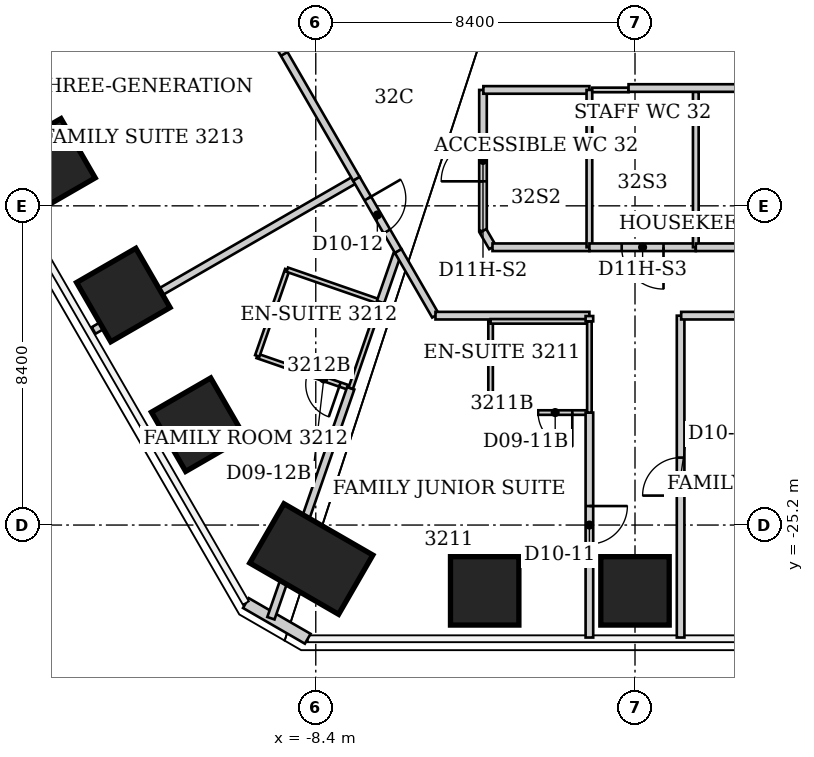
"""IFC4 building model, lengths in metres.
Left out: names, types, materials, properties, quantities, classifications, styles, units other than length and angle.
Written with IfcOpenShell. Run it as: python <this file> out.ifc"""

import sys

from ifc_helpers import new_model, si_unit, direction, frame, frame_2d, origin, origin_2d, place, context, subcontext, project, spatial, rectangle, extrude, element, fill, save


model = new_model("IFC4")
c1 = context("Model", 3, precision=1e-05, world=origin(), true_north=direction((0.0, 1.0)))
c2 = subcontext(c1, "Body", "Model", "MODEL_VIEW")
j1 = project(units=[si_unit("LENGTHUNIT", "METRE"), si_unit("PLANEANGLEUNIT", "RADIAN")], contexts=[c1])
p1 = place(None, origin())
s1 = spatial("IfcSite", under=j1, at=p1, CompositionType="ELEMENT")
p2 = place(p1, origin())
s2 = spatial("IfcBuilding", under=s1, at=p2, CompositionType="ELEMENT")
p3 = place(p2, frame((0.0, 0.0, 131.0)))
s3 = spatial("IfcBuildingStorey", under=s2, at=p3, CompositionType="ELEMENT", Elevation=131.0)
for number, where, z_axis, x_axis in (
    (1, (0.0, -26.932, 0.0), (0.0, 0.0, 1.0), (0.0, -1.0, 0.0)),
    (2, (-3.955, -26.932, 0.0), (0.0, 0.0, 1.0), (0.0, -1.0, 0.0)),
):
    element("IfcColumn", number, at=place(p3, frame(where, z_axis=z_axis, x_axis=x_axis)), inside=s3, PredefinedType="COLUMN", context=c2, shape_type="SweptSolid", body=[
        extrude(rectangle(XDim=1.8, YDim=1.8, at=origin_2d()), origin(), (0.0, 0.0, 1.0), 3.8),
    ])
p4 = place(p3, frame((-8.518, -26.094, 0.0), z_axis=(0.0, 0.0, 1.0), x_axis=(-0.5, -0.866025403784, 0.0)))
e3 = element("IfcColumn", 3, at=p4, inside=s3, PredefinedType="COLUMN", context=c2, shape_type="SweptSolid", body=[
    extrude(rectangle(XDim=1.8, YDim=2.7, at=origin_2d()), origin(), (0.0, 0.0, 1.0), 3.8),
])
for number, where, z_axis, x_axis in (
    (4, (-11.494, -22.559, 0.0), (0.0, 0.0, 1.0), (-0.866, -0.5, 0.0)),
    (5, (-13.464, -19.147, 0.0), (0.0, 0.0, 1.0), (-0.866, -0.5, 0.0)),
    (6, (-15.434, -15.735, 0.0), (0.0, 0.0, 1.0), (-0.866, -0.5, 0.0)),
):
    element("IfcColumn", number, at=place(p3, frame(where, z_axis=z_axis, x_axis=x_axis)), inside=s3, PredefinedType="COLUMN", context=c2, shape_type="SweptSolid", body=[
        extrude(rectangle(XDim=1.8, YDim=1.8, at=origin_2d()), origin(), (0.0, 0.0, 1.0), 3.8),
    ])
p5 = place(p3, frame((-8.611, -28.192, 0.0), z_axis=(0.0, 0.0, 1.0), x_axis=(-0.866045024864, 0.499966013754, 0.0)))
e7 = element("IfcWall", 7, at=p5, inside=s3, PredefinedType="SOLIDWALL", context=c2, shape_type="SweptSolid", body=[
    extrude(rectangle(XDim=1.88, YDim=0.3, at=frame_2d((0.94, 0.0))), origin(), (0.0, 0.0, 1.0), 3.64),
])
p6 = place(p3, frame((-14.246, -20.08, 0.0), z_axis=(0.0, 0.0, 1.0), x_axis=(0.866178955952, 0.49973394548, 0.0)))
e8 = element("IfcWall", 8, at=p6, inside=s3, PredefinedType="PARTITIONING", context=c2, shape_type="SweptSolid", body=[
    extrude(rectangle(XDim=7.969, YDim=0.2, at=frame_2d((3.985, 0.0))), origin(), (0.0, 0.0, 1.0), 3.64),
])
p7 = place(p3, frame((-11.63, -8.65, 0.0), z_axis=(0.0, 0.0, 1.0), x_axis=(0.500367528775, -0.865813106939, 0.0)))
e9 = element("IfcWall", 9, at=p7, inside=s3, PredefinedType="PARTITIONING", context=c2, shape_type="SweptSolid", body=[
    extrude(rectangle(XDim=8.593, YDim=0.2, at=frame_2d((4.297, 0.0))), origin(), (0.0, 0.0, 1.0), 3.64),
])
p8 = place(p7, frame((3.797, 0.0, 0.0)))
e10 = element("IfcOpeningElement", 10, at=p8, cuts=e9, PredefinedType="OPENING", context=c2, shape_type="SweptSolid", body=[
    extrude(rectangle(XDim=1.0, YDim=2.13, at=frame_2d((0.5, 1.065))), frame((0.0, 0.1, 0.0), z_axis=(0.0, -1.0, 0.0), x_axis=(1.0, 0.0, 0.0)), (0.0, 0.0, 1.0), 0.2),
])
p9 = place(p3, frame((-9.94, -20.75, 0.0), z_axis=(0.0, 0.0, 1.0), x_axis=(0.94515546045, -0.326620813149, 0.0)))
e11 = element("IfcWall", 11, at=p9, inside=s3, PredefinedType="PARTITIONING", context=c2, shape_type="SweptSolid", body=[
    extrude(rectangle(XDim=2.603, YDim=0.12, at=frame_2d((1.301, 0.0))), origin(), (0.0, 0.0, 1.0), 3.64),
])
p10 = place(p9, frame((1.403, 0.0, 0.0)))
e12 = element("IfcOpeningElement", 12, at=p10, cuts=e11, PredefinedType="OPENING", context=c2, shape_type="SweptSolid", body=[
    extrude(rectangle(XDim=0.9, YDim=2.03, at=frame_2d((0.45, 1.015))), frame((0.0, 0.06, 0.0), z_axis=(0.0, -1.0, 0.0), x_axis=(1.0, 0.0, 0.0)), (0.0, 0.0, 1.0), 0.12),
])
p11 = place(p3, frame((-9.58, -27.652, 0.0), z_axis=(0.0, 0.0, 1.0), x_axis=(0.327855318627, 0.944727944991, 0.0)))
e13 = element("IfcWall", 13, at=p11, inside=s3, PredefinedType="PARTITIONING", context=c2, shape_type="SweptSolid", body=[
    extrude(rectangle(XDim=6.406, YDim=0.2, at=frame_2d((3.203, 0.0))), origin(), (0.0, 0.0, 1.0), 3.64),
])
p12 = place(p3, frame((-9.15, -18.48, 0.0), z_axis=(0.0, 0.0, 1.0), x_axis=(-0.328693963496, -0.944436487203, 0.0)))
e14 = element("IfcWall", 14, at=p12, inside=s3, PredefinedType="PARTITIONING", context=c2, shape_type="SweptSolid", body=[
    extrude(rectangle(XDim=2.404, YDim=0.12, at=frame_2d((1.202, 0.0))), origin(), (0.0, 0.0, 1.0), 3.64),
])
p13 = place(p3, frame((-7.48, -21.6, 0.0), z_axis=(0.0, 0.0, 1.0), x_axis=(0.326492166492, 0.945199907543, 0.0)))
e15 = element("IfcWall", 15, at=p13, inside=s3, PredefinedType="PARTITIONING", context=c2, shape_type="SweptSolid", body=[
    extrude(rectangle(XDim=2.4, YDim=0.12, at=frame_2d((1.2, 0.0))), origin(), (0.0, 0.0, 1.0), 3.64),
])
p14 = place(p3, frame((-7.33, -16.09, 0.0), z_axis=(0.0, 0.0, 1.0), x_axis=(0.501088872721, -0.865395829453, 0.0)))
e16 = element("IfcWall", 16, at=p14, inside=s3, PredefinedType="PARTITIONING", context=c2, shape_type="SweptSolid", body=[
    extrude(rectangle(XDim=2.195, YDim=0.2, at=frame_2d((1.098, 0.0))), origin(), (0.0, 0.0, 1.0), 3.64),
])
p15 = place(p14, frame((0.598, 0.0, 0.0)))
e17 = element("IfcOpeningElement", 17, at=p15, cuts=e16, PredefinedType="OPENING", context=c2, shape_type="SweptSolid", body=[
    extrude(rectangle(XDim=1.0, YDim=2.13, at=frame_2d((0.5, 1.065))), frame((0.0, 0.1, 0.0), z_axis=(0.0, -1.0, 0.0), x_axis=(1.0, 0.0, 0.0)), (0.0, 0.0, 1.0), 0.2),
])
p16 = place(p3, frame((-6.7, -19.33, 0.0), z_axis=(0.0, 0.0, 1.0), x_axis=(-0.944753042377, 0.327782990589, 0.0)))
e18 = element("IfcWall", 18, at=p16, inside=s3, PredefinedType="PARTITIONING", context=c2, shape_type="SweptSolid", body=[
    extrude(rectangle(XDim=2.594, YDim=0.12, at=frame_2d((1.297, 0.0))), origin(), (0.0, 0.0, 1.0), 3.64),
])
p17 = place(p3, frame((-6.696, -19.331, 0.0), z_axis=(0.0, 0.0, 1.0), x_axis=(0.328298231075, 0.944574121746, 0.0)))
e19 = element("IfcWall", 19, at=p17, inside=s3, PredefinedType="PARTITIONING", context=c2, shape_type="SweptSolid", body=[
    extrude(rectangle(XDim=1.32, YDim=0.2, at=frame_2d((0.66, 0.0))), origin(), (0.0, 0.0, 1.0), 3.64),
])
p18 = place(p3, frame((-6.23, -17.99, 0.0), z_axis=(0.0, 0.0, 1.0), x_axis=(0.499431599995, -0.866353321068, 0.0)))
e20 = element("IfcWall", 20, at=p18, inside=s3, PredefinedType="PARTITIONING", context=c2, shape_type="SweptSolid", body=[
    extrude(rectangle(XDim=1.962, YDim=0.2, at=frame_2d((0.981, 0.0))), origin(), (0.0, 0.0, 1.0), 3.64),
])
p19 = place(p3, frame((-5.25, -19.69, 0.0), z_axis=(0.0, 0.0, 1.0), x_axis=(1.0, 0.0, 0.0)))
e21 = element("IfcWall", 21, at=p19, inside=s3, PredefinedType="PARTITIONING", context=c2, shape_type="SweptSolid", body=[
    extrude(rectangle(XDim=4.05, YDim=0.2, at=frame_2d((2.025, 0.0))), origin(), (0.0, 0.0, 1.0), 3.64),
])
p20 = place(p3, frame((-4.0, -17.46, 0.0), z_axis=(0.0, 0.0, 1.0), x_axis=(0.0, 1.0, 0.0)))
e22 = element("IfcWall", 22, at=p20, inside=s3, PredefinedType="PARTITIONING", context=c2, shape_type="SweptSolid", body=[
    extrude(rectangle(XDim=3.71, YDim=0.2, at=frame_2d((1.855, 0.0))), origin(), (0.0, 0.0, 1.0), 2.878),
])
p21 = place(p20, frame((1.305, 0.0, 0.0)))
e23 = element("IfcOpeningElement", 23, at=p21, cuts=e22, PredefinedType="OPENING", context=c2, shape_type="SweptSolid", body=[
    extrude(rectangle(XDim=1.1, YDim=2.2, at=frame_2d((0.55, 1.1))), frame((0.0, 0.1, 0.0), z_axis=(0.0, -1.0, 0.0), x_axis=(1.0, 0.0, 0.0)), (0.0, 0.0, 1.0), 0.2),
])
p22 = place(p3, frame((-3.99, -13.75, 0.0), z_axis=(0.0, 0.0, 1.0), x_axis=(1.0, 0.0, 0.0)))
e24 = element("IfcWall", 24, at=p22, inside=s3, PredefinedType="PARTITIONING", context=c2, shape_type="SweptSolid", body=[
    extrude(rectangle(XDim=2.79, YDim=0.2, at=frame_2d((1.395, 0.0))), origin(), (0.0, 0.0, 1.0), 3.64),
])
p23 = place(p3, frame((-3.8, -22.24, 0.0), z_axis=(0.0, 0.0, 1.0), x_axis=(1.0, 0.0, 0.0)))
e25 = element("IfcWall", 25, at=p23, inside=s3, PredefinedType="PARTITIONING", context=c2, shape_type="SweptSolid", body=[
    extrude(rectangle(XDim=2.6, YDim=0.12, at=frame_2d((1.3, 0.0))), origin(), (0.0, 0.0, 1.0), 3.64),
])
p24 = place(p23, frame((1.25, 0.0, 0.0)))
e26 = element("IfcOpeningElement", 26, at=p24, cuts=e25, PredefinedType="OPENING", context=c2, shape_type="SweptSolid", body=[
    extrude(rectangle(XDim=0.9, YDim=2.03, at=frame_2d((0.45, 1.015))), frame((0.0, 0.06, 0.0), z_axis=(0.0, -1.0, 0.0), x_axis=(1.0, 0.0, 0.0)), (0.0, 0.0, 1.0), 0.12),
])
p25 = place(p3, frame((-3.8, -19.84, 0.0), z_axis=(0.0, 0.0, 1.0), x_axis=(0.0, -1.0, 0.0)))
e27 = element("IfcWall", 27, at=p25, inside=s3, PredefinedType="PARTITIONING", context=c2, shape_type="SweptSolid", body=[
    extrude(rectangle(XDim=2.4, YDim=0.12, at=frame_2d((1.2, 0.0))), origin(), (0.0, 0.0, 1.0), 3.64),
])
p26 = place(p3, frame((-3.75, -17.89, 0.0), z_axis=(0.0, 0.0, 1.0), x_axis=(-0.502680181512, 0.864472460588, 0.0)))
e28 = element("IfcWall", 28, at=p26, inside=s3, PredefinedType="PARTITIONING", context=c2, shape_type="SweptSolid", body=[
    extrude(rectangle(XDim=0.497, YDim=0.2, at=frame_2d((0.249, 0.0))), origin(), (0.0, 0.0, 1.0), 3.64),
])
p27 = place(p3, frame((-1.2, -22.24, 0.0), z_axis=(0.0, 0.0, 1.0), x_axis=(0.0, -1.0, 0.0)))
e29 = element("IfcWall", 29, at=p27, inside=s3, PredefinedType="PARTITIONING", context=c2, shape_type="SweptSolid", body=[
    extrude(rectangle(XDim=5.92, YDim=0.2, at=frame_2d((2.96, 0.0))), origin(), (0.0, 0.0, 1.0), 3.64),
])
p28 = place(p27, frame((2.46, 0.0, 0.0)))
e30 = element("IfcOpeningElement", 30, at=p28, cuts=e29, PredefinedType="OPENING", context=c2, shape_type="SweptSolid", body=[
    extrude(rectangle(XDim=1.0, YDim=2.13, at=frame_2d((0.5, 1.065))), frame((0.0, 0.1, 0.0), z_axis=(0.0, -1.0, 0.0), x_axis=(1.0, 0.0, 0.0)), (0.0, 0.0, 1.0), 0.2),
])
p29 = place(p3, frame((-1.2, -19.84, 0.0), z_axis=(0.0, 0.0, 1.0), x_axis=(-1.0, 0.0, 0.0)))
e31 = element("IfcWall", 31, at=p29, inside=s3, PredefinedType="PARTITIONING", context=c2, shape_type="SweptSolid", body=[
    extrude(rectangle(XDim=2.6, YDim=0.12, at=frame_2d((1.3, 0.0))), origin(), (0.0, 0.0, 1.0), 3.64),
])
p30 = place(p3, frame((-1.2, -19.84, 0.0), z_axis=(0.0, 0.0, 1.0), x_axis=(0.0, -1.0, 0.0)))
e32 = element("IfcWall", 32, at=p30, inside=s3, PredefinedType="PARTITIONING", context=c2, shape_type="SweptSolid", body=[
    extrude(rectangle(XDim=2.4, YDim=0.12, at=frame_2d((1.2, 0.0))), origin(), (0.0, 0.0, 1.0), 3.64),
])
p31 = place(p3, frame((-1.2, -19.7, 0.0), z_axis=(0.0, 0.0, 1.0), x_axis=(0.0, -1.0, 0.0)))
e33 = element("IfcWall", 33, at=p31, inside=s3, PredefinedType="PARTITIONING", context=c2, shape_type="SweptSolid", body=[
    extrude(rectangle(XDim=0.14, YDim=0.2, at=frame_2d((0.07, 0.0))), origin(), (0.0, 0.0, 1.0), 3.64),
])
p32 = place(p3, frame((-1.2, -17.89, 0.0), z_axis=(0.0, 0.0, 1.0), x_axis=(-1.0, 0.0, 0.0)))
e34 = element("IfcWall", 34, at=p32, inside=s3, PredefinedType="PARTITIONING", context=c2, shape_type="SweptSolid", body=[
    extrude(rectangle(XDim=2.55, YDim=0.2, at=frame_2d((1.275, 0.0))), origin(), (0.0, 0.0, 1.0), 3.64),
])
p33 = place(p3, frame((-1.2, -13.75, 0.0), z_axis=(0.0, 0.0, 1.0), x_axis=(0.0, -1.0, 0.0)))
e35 = element("IfcWall", 35, at=p33, inside=s3, PredefinedType="PARTITIONING", context=c2, shape_type="SweptSolid", body=[
    extrude(rectangle(XDim=4.14, YDim=0.15, at=frame_2d((2.07, 0.0))), origin(), (0.0, 0.0, 1.0), 3.64),
])
p34 = place(p3, frame((-1.125, -13.75, 0.0), z_axis=(0.0, 0.0, 1.0), x_axis=(1.0, 0.0, 0.0)))
e36 = element("IfcWall", 36, at=p34, inside=s3, PredefinedType="PARTITIONING", context=c2, shape_type="SweptSolid", body=[
    extrude(rectangle(XDim=0.955, YDim=0.12, at=frame_2d((0.478, 0.0))), origin(), (0.0, 0.0, 1.0), 3.64),
])
p35 = place(p3, frame((1.2, -28.16, 0.0), z_axis=(0.0, 0.0, 1.0), x_axis=(0.0, 1.0, 0.0)))
e37 = element("IfcWall", 37, at=p35, inside=s3, PredefinedType="PARTITIONING", context=c2, shape_type="SweptSolid", body=[
    extrude(rectangle(XDim=8.47, YDim=0.2, at=frame_2d((4.235, 0.0))), origin(), (0.0, 0.0, 1.0), 3.64),
])
p36 = place(p35, frame((3.735, 0.0, 0.0)))
e38 = element("IfcOpeningElement", 38, at=p36, cuts=e37, PredefinedType="OPENING", context=c2, shape_type="SweptSolid", body=[
    extrude(rectangle(XDim=1.0, YDim=2.13, at=frame_2d((0.5, 1.065))), frame((0.0, 0.1, 0.0), z_axis=(0.0, -1.0, 0.0), x_axis=(1.0, 0.0, 0.0)), (0.0, 0.0, 1.0), 0.2),
])
p37 = place(p3, frame((1.215, -19.69, 0.0), z_axis=(0.0, 0.0, 1.0), x_axis=(1.0, 0.0, 0.0)))
e39 = element("IfcWall", 39, at=p37, inside=s3, PredefinedType="PARTITIONING", context=c2, shape_type="SweptSolid", body=[
    extrude(rectangle(XDim=4.035, YDim=0.2, at=frame_2d((2.018, 0.0))), origin(), (0.0, 0.0, 1.0), 3.64),
])
p38 = place(p3, frame((1.6, -17.89, 0.0), z_axis=(0.0, 0.0, 1.0), x_axis=(-1.0, 0.0, 0.0)))
e40 = element("IfcWall", 40, at=p38, inside=s3, PredefinedType="PARTITIONING", context=c2, shape_type="SweptSolid", body=[
    extrude(rectangle(XDim=2.8, YDim=0.2, at=frame_2d((1.4, 0.0))), origin(), (0.0, 0.0, 1.0), 3.64),
])
p39 = place(p38, frame((0.85, 0.0, 0.0)))
e41 = element("IfcOpeningElement", 41, at=p39, cuts=e40, PredefinedType="OPENING", context=c2, shape_type="SweptSolid", body=[
    extrude(rectangle(XDim=1.1, YDim=2.2, at=frame_2d((0.55, 1.1))), frame((0.0, 0.1, 0.0), z_axis=(0.0, -1.0, 0.0), x_axis=(1.0, 0.0, 0.0)), (0.0, 0.0, 1.0), 0.2),
])
p40 = place(p3, frame((1.6, -13.8, 0.0), z_axis=(0.0, 0.0, 1.0), x_axis=(0.0, -1.0, 0.0)))
e42 = element("IfcWall", 42, at=p40, inside=s3, PredefinedType="PARTITIONING", context=c2, shape_type="SweptSolid", body=[
    extrude(rectangle(XDim=4.09, YDim=0.15, at=frame_2d((2.045, 0.0))), origin(), (0.0, 0.0, 1.0), 3.64),
])
p41 = place(p3, frame((3.75, -17.89, 0.0), z_axis=(0.0, 0.0, 1.0), x_axis=(-1.0, 0.0, 0.0)))
e43 = element("IfcWall", 43, at=p41, inside=s3, PredefinedType="PARTITIONING", context=c2, shape_type="SweptSolid", body=[
    extrude(rectangle(XDim=2.15, YDim=0.2, at=frame_2d((1.075, 0.0))), origin(), (0.0, 0.0, 1.0), 3.64),
])
p42 = place(p3, frame((8.534, -13.7, 0.0), z_axis=(0.0, 0.0, 1.0), x_axis=(-1.0, 0.0, 0.0)))
e44 = element("IfcWall", 44, at=p42, inside=s3, PredefinedType="PARTITIONING", context=c2, shape_type="SweptSolid", body=[
    extrude(rectangle(XDim=8.704, YDim=0.2, at=frame_2d((4.352, 0.0))), origin(), (0.0, 0.0, 1.0), 3.64),
])
p43 = place(p42, frame((3.802, 0.0, 0.0)))
e45 = element("IfcOpeningElement", 45, at=p43, cuts=e44, PredefinedType="OPENING", context=c2, shape_type="SweptSolid", body=[
    extrude(rectangle(XDim=1.1, YDim=2.2, at=frame_2d((0.55, 1.1))), frame((0.0, 0.1, 0.0), z_axis=(0.0, -1.0, 0.0), x_axis=(1.0, 0.0, 0.0)), (0.0, 0.0, 1.0), 0.2),
])
p44 = place(p36, origin())
e46 = element("IfcDoor", 46, at=p44, inside=s3, OperationType="SINGLE_SWING_LEFT", PredefinedType="DOOR", context=c2, shape_type="SweptSolid", body=[
    extrude(rectangle(XDim=1.0, YDim=2.13, at=frame_2d((0.5, 1.065))), frame((0.0, 0.025, 0.0), z_axis=(0.0, -1.0, 0.0), x_axis=(1.0, 0.0, 0.0)), (0.0, 0.0, 1.0), 0.05),
])
fill(e38, e46)
p45 = place(p28, origin())
e47 = element("IfcDoor", 47, at=p45, inside=s3, OperationType="SINGLE_SWING_LEFT", PredefinedType="DOOR", context=c2, shape_type="SweptSolid", body=[
    extrude(rectangle(XDim=1.0, YDim=2.13, at=frame_2d((0.5, 1.065))), frame((0.0, 0.025, 0.0), z_axis=(0.0, -1.0, 0.0), x_axis=(1.0, 0.0, 0.0)), (0.0, 0.0, 1.0), 0.05),
])
fill(e30, e47)
p46 = place(p24, origin())
e48 = element("IfcDoor", 48, at=p46, inside=s3, OperationType="SINGLE_SWING_RIGHT", PredefinedType="DOOR", context=c2, shape_type="SweptSolid", body=[
    extrude(rectangle(XDim=0.9, YDim=2.03, at=frame_2d((0.45, 1.015))), frame((0.0, 0.025, 0.0), z_axis=(0.0, -1.0, 0.0), x_axis=(1.0, 0.0, 0.0)), (0.0, 0.0, 1.0), 0.05),
])
fill(e26, e48)
p47 = place(p15, origin())
e49 = element("IfcDoor", 49, at=p47, inside=s3, OperationType="SINGLE_SWING_LEFT", PredefinedType="DOOR", context=c2, shape_type="SweptSolid", body=[
    extrude(rectangle(XDim=1.0, YDim=2.13, at=frame_2d((0.5, 1.065))), frame((0.0, 0.025, 0.0), z_axis=(0.0, -1.0, 0.0), x_axis=(1.0, 0.0, 0.0)), (0.0, 0.0, 1.0), 0.05),
])
fill(e17, e49)
p48 = place(p10, origin())
e50 = element("IfcDoor", 50, at=p48, inside=s3, OperationType="SINGLE_SWING_RIGHT", PredefinedType="DOOR", context=c2, shape_type="SweptSolid", body=[
    extrude(rectangle(XDim=0.9, YDim=2.03, at=frame_2d((0.45, 1.015))), frame((0.0, 0.025, 0.0), z_axis=(0.0, -1.0, 0.0), x_axis=(1.0, 0.0, 0.0)), (0.0, 0.0, 1.0), 0.05),
])
fill(e12, e50)
p49 = place(p8, origin())
e51 = element("IfcDoor", 51, at=p49, inside=s3, OperationType="SINGLE_SWING_LEFT", PredefinedType="DOOR", context=c2, shape_type="SweptSolid", body=[
    extrude(rectangle(XDim=1.0, YDim=2.13, at=frame_2d((0.5, 1.065))), frame((0.0, 0.025, 0.0), z_axis=(0.0, -1.0, 0.0), x_axis=(1.0, 0.0, 0.0)), (0.0, 0.0, 1.0), 0.05),
])
fill(e10, e51)
p50 = place(p21, origin())
e52 = element("IfcDoor", 52, at=p50, inside=s3, OperationType="SINGLE_SWING_LEFT", PredefinedType="DOOR", context=c2, shape_type="SweptSolid", body=[
    extrude(rectangle(XDim=1.1, YDim=2.2, at=frame_2d((0.55, 1.1))), frame((0.0, 0.025, 0.0), z_axis=(0.0, -1.0, 0.0), x_axis=(1.0, 0.0, 0.0)), (0.0, 0.0, 1.0), 0.05),
])
fill(e23, e52)
p51 = place(p39, origin())
e53 = element("IfcDoor", 53, at=p51, inside=s3, OperationType="SINGLE_SWING_LEFT", PredefinedType="DOOR", context=c2, shape_type="SweptSolid", body=[
    extrude(rectangle(XDim=1.1, YDim=2.2, at=frame_2d((0.55, 1.1))), frame((0.0, 0.025, 0.0), z_axis=(0.0, -1.0, 0.0), x_axis=(1.0, 0.0, 0.0)), (0.0, 0.0, 1.0), 0.05),
])
fill(e41, e53)
save(model, sys.argv[1])
